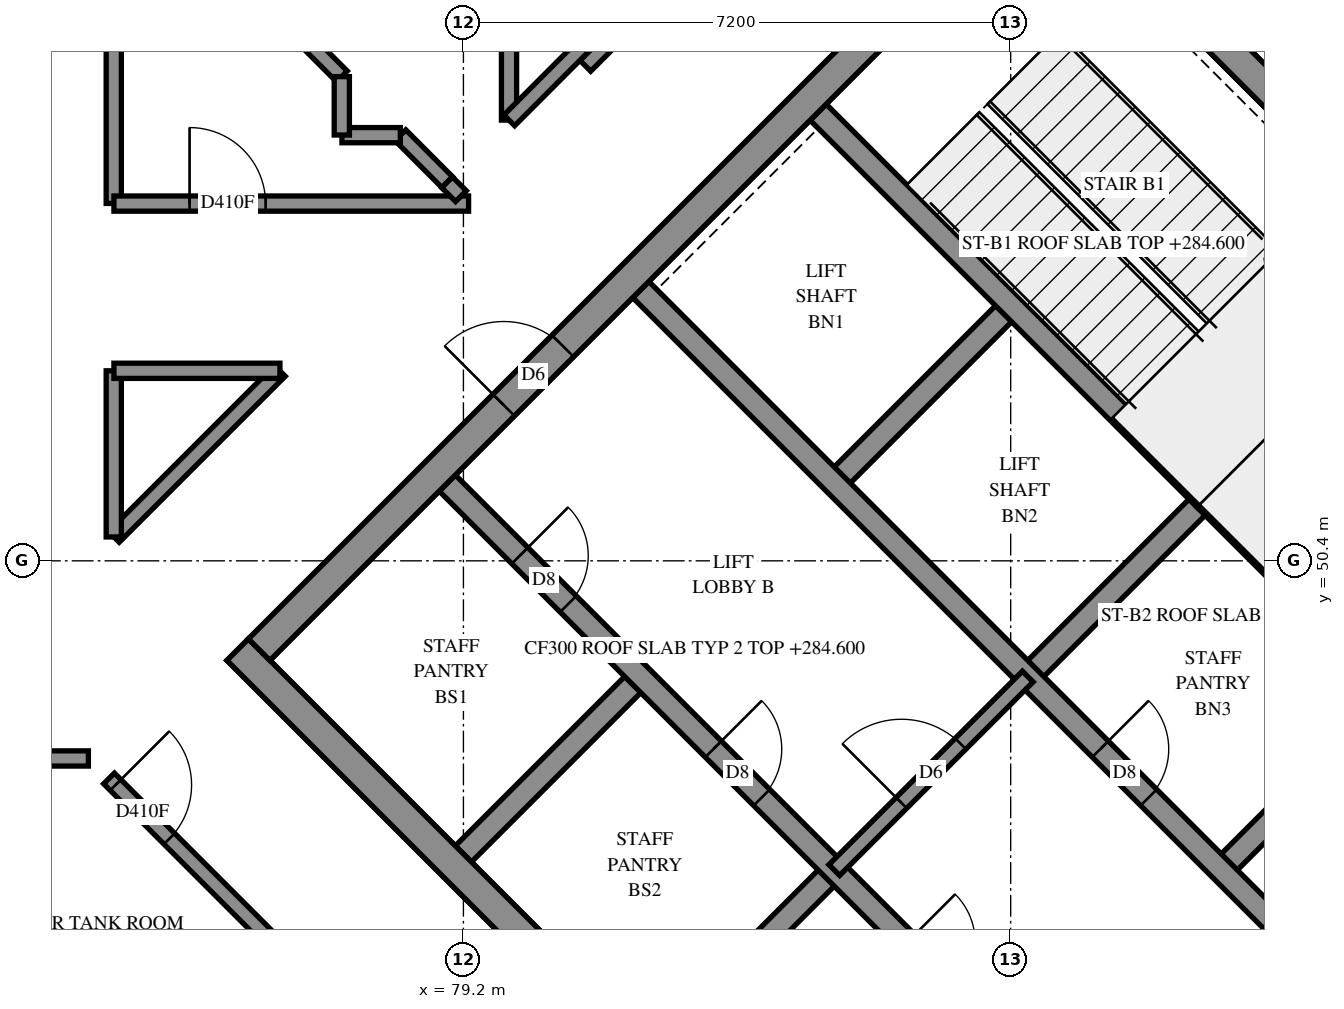
"""IFC4 building model, lengths in metres.
Left out: names, types, materials, properties, quantities, classifications, styles, units other than length and angle.
Written with IfcOpenShell. Run it as: python <this file> out.ifc"""

import sys

from ifc_helpers import new_model, si_unit, direction, frame, frame_2d, origin, place, context, subcontext, project, spatial, rectangle, extrude, element, fill, save


model = new_model("IFC4")
c1 = context("Model", 3, precision=1e-05, world=origin(), true_north=direction((0.0, 1.0)))
c2 = subcontext(c1, "Body", "Model", "MODEL_VIEW")
j1 = project(units=[si_unit("LENGTHUNIT", "METRE"), si_unit("PLANEANGLEUNIT", "RADIAN")], contexts=[c1])
p1 = place(None, origin())
s1 = spatial("IfcSite", under=j1, at=p1, CompositionType="ELEMENT")
p2 = place(p1, origin())
s2 = spatial("IfcBuilding", under=s1, at=p2, CompositionType="ELEMENT")
p3 = place(p2, frame((0.0, 0.0, 284.6)))
s3 = spatial("IfcBuildingStorey", under=s2, at=p3, CompositionType="ELEMENT", Elevation=284.6)
p4 = place(p3, frame((76.23, 49.231, -0.3), z_axis=(0.0, 0.0, 1.0), x_axis=(0.7071034917, -0.7071100706, 0.0)))
e1 = element("IfcWall", 1, at=p4, inside=s3, PredefinedType="SHEAR", context=c2, shape_type="SweptSolid", body=[
    extrude(rectangle(XDim=15.2, YDim=0.4, at=frame_2d((7.6, 0.0))), origin(), (0.0, 0.0, 1.0), 5.3),
])
p5 = place(p3, frame((86.695, 59.696, -0.3), z_axis=(0.0, 0.0, 1.0), x_axis=(0.7071100706, -0.7071034917, 0.0)))
e2 = element("IfcWall", 2, at=p5, inside=s3, PredefinedType="SHEAR", context=c2, shape_type="SweptSolid", body=[
    extrude(rectangle(XDim=15.2, YDim=0.4, at=frame_2d((7.6, 0.0))), origin(), (0.0, 0.0, 1.0), 5.3),
])
p6 = place(p5, frame((10.4, 0.0, 0.3)))
e3 = element("IfcOpeningElement", 3, at=p6, cuts=e2, PredefinedType="OPENING", context=c2, shape_type="SweptSolid", body=[
    extrude(rectangle(XDim=0.8, YDim=2.1, at=frame_2d((0.4, 1.05))), frame((0.0, 0.21, 0.0), z_axis=(0.0, -1.0, 0.0), x_axis=(1.0, 0.0, 0.0)), (0.0, 0.0, 1.0), 0.42),
])
p7 = place(p3, frame((76.513, 49.231, -0.3), z_axis=(0.0, 0.0, 1.0), x_axis=(0.7071067812, 0.7071067812, 0.0)))
e4 = element("IfcWall", 4, at=p7, inside=s3, PredefinedType="SHEAR", context=c2, shape_type="SweptSolid", body=[
    extrude(rectangle(XDim=14.4, YDim=0.4, at=frame_2d((7.2, 0.0))), origin(), (0.0, 0.0, 1.0), 5.3),
])
p8 = place(p7, frame((4.55, 0.0, 0.3)))
e5 = element("IfcOpeningElement", 5, at=p8, cuts=e4, PredefinedType="OPENING", context=c2, shape_type="SweptSolid", body=[
    extrude(rectangle(XDim=1.1, YDim=2.1, at=frame_2d((0.55, 1.05))), frame((0.0, 0.21, 0.0), z_axis=(0.0, -1.0, 0.0), x_axis=(1.0, 0.0, 0.0)), (0.0, 0.0, 1.0), 0.42),
])
p9 = place(p7, frame((11.35, 0.0, 0.3)))
e6 = element("IfcOpeningElement", 6, at=p9, cuts=e4, PredefinedType="OPENING", context=c2, shape_type="SweptSolid", body=[
    extrude(rectangle(XDim=1.1, YDim=2.1, at=frame_2d((0.55, 1.05))), frame((0.0, 0.21, 0.0), z_axis=(0.0, -1.0, 0.0), x_axis=(1.0, 0.0, 0.0)), (0.0, 0.0, 1.0), 0.42),
])
p10 = place(p3, frame((86.978, 38.766, -0.3), z_axis=(0.0, 0.0, 1.0), x_axis=(0.7071067812, 0.7071067812, 0.0)))
e7 = element("IfcWall", 7, at=p10, inside=s3, PredefinedType="SHEAR", context=c2, shape_type="SweptSolid", body=[
    extrude(rectangle(XDim=14.4, YDim=0.4, at=frame_2d((7.2, 0.0))), origin(), (0.0, 0.0, 1.0), 5.3),
])
p11 = place(p10, frame((4.55, 0.0, 0.3)))
e8 = element("IfcOpeningElement", 8, at=p11, cuts=e7, PredefinedType="OPENING", context=c2, shape_type="SweptSolid", body=[
    extrude(rectangle(XDim=1.1, YDim=2.1, at=frame_2d((0.55, 1.05))), frame((0.0, 0.21, 0.0), z_axis=(0.0, -1.0, 0.0), x_axis=(1.0, 0.0, 0.0)), (0.0, 0.0, 1.0), 0.42),
])
p12 = place(p10, frame((11.35, 0.0, 0.3)))
e9 = element("IfcOpeningElement", 9, at=p12, cuts=e7, PredefinedType="OPENING", context=c2, shape_type="SweptSolid", body=[
    extrude(rectangle(XDim=1.1, YDim=2.1, at=frame_2d((0.55, 1.05))), frame((0.0, 0.21, 0.0), z_axis=(0.0, -1.0, 0.0), x_axis=(1.0, 0.0, 0.0)), (0.0, 0.0, 1.0), 0.42),
])
for number, where, z_axis, x_axis in (
    (10, (79.2, 46.544, 0.0), (0.0, 0.0, 1.0), (0.707, 0.707, 0.0)),
    (11, (84.079, 51.423, 0.0), (0.0, 0.0, 1.0), (0.707, 0.707, 0.0)),
):
    element("IfcWall", number, at=place(p3, frame(where, z_axis=z_axis, x_axis=x_axis)), inside=s3, PredefinedType="SOLIDWALL", context=c2, shape_type="SweptSolid", body=[
        extrude(rectangle(XDim=3.3, YDim=0.3, at=frame_2d((1.65, 0.0))), origin(), (0.0, 0.0, 1.0), 5.7),
    ])
p13 = place(p3, frame((81.746, 43.999, 0.0), z_axis=(0.0, 0.0, 1.0), x_axis=(0.7071067812, 0.7071067812, 0.0)))
e12 = element("IfcWall", 12, at=p13, inside=s3, PredefinedType="SOLIDWALL", context=c2, shape_type="SweptSolid", body=[
    extrude(rectangle(XDim=3.3, YDim=0.3, at=frame_2d((1.65, 0.0))), origin(), (0.0, 0.0, 1.0), 5.7),
])
for number, where, z_axis, x_axis in (
    (13, (86.625, 48.878, 0.0), (0.0, 0.0, 1.0), (0.707, 0.707, 0.0)),
    (14, (89.17, 46.332, 0.0), (0.0, 0.0, 1.0), (0.707, 0.707, 0.0)),
):
    element("IfcWall", number, at=place(p3, frame(where, z_axis=z_axis, x_axis=x_axis)), inside=s3, PredefinedType="SOLIDWALL", context=c2, shape_type="SweptSolid", body=[
        extrude(rectangle(XDim=3.3, YDim=0.3, at=frame_2d((1.65, 0.0))), origin(), (0.0, 0.0, 1.0), 5.7),
    ])
p14 = place(p3, frame((78.988, 51.423, 0.0), z_axis=(0.0, 0.0, 1.0), x_axis=(0.7071067812, -0.7071067812, 0.0)))
e15 = element("IfcWall", 15, at=p14, inside=s3, PredefinedType="SOLIDWALL", context=c2, shape_type="SweptSolid", body=[
    extrude(rectangle(XDim=14.4, YDim=0.3, at=frame_2d((7.2, 0.0))), origin(), (0.0, 0.0, 1.0), 5.7),
])
p15 = place(p14, frame((1.35, 0.0, 0.0)))
e16 = element("IfcOpeningElement", 16, at=p15, cuts=e15, PredefinedType="OPENING", context=c2, shape_type="SweptSolid", body=[
    extrude(rectangle(XDim=0.9, YDim=2.1, at=frame_2d((0.45, 1.05))), frame((0.0, 0.16, 0.0), z_axis=(0.0, -1.0, 0.0), x_axis=(1.0, 0.0, 0.0)), (0.0, 0.0, 1.0), 0.32),
])
p16 = place(p14, frame((4.95, 0.0, 0.0)))
e17 = element("IfcOpeningElement", 17, at=p16, cuts=e15, PredefinedType="OPENING", context=c2, shape_type="SweptSolid", body=[
    extrude(rectangle(XDim=0.9, YDim=2.1, at=frame_2d((0.45, 1.05))), frame((0.0, 0.16, 0.0), z_axis=(0.0, -1.0, 0.0), x_axis=(1.0, 0.0, 0.0)), (0.0, 0.0, 1.0), 0.32),
])
p17 = place(p14, frame((8.55, 0.0, 0.0)))
e18 = element("IfcOpeningElement", 18, at=p17, cuts=e15, PredefinedType="OPENING", context=c2, shape_type="SweptSolid", body=[
    extrude(rectangle(XDim=0.9, YDim=2.1, at=frame_2d((0.45, 1.05))), frame((0.0, 0.16, 0.0), z_axis=(0.0, -1.0, 0.0), x_axis=(1.0, 0.0, 0.0)), (0.0, 0.0, 1.0), 0.32),
])
p18 = place(p14, frame((12.05, 0.0, 0.0)))
e19 = element("IfcOpeningElement", 19, at=p18, cuts=e15, PredefinedType="OPENING", context=c2, shape_type="SweptSolid", body=[
    extrude(rectangle(XDim=1.1, YDim=2.1, at=frame_2d((0.55, 1.05))), frame((0.0, 0.16, 0.0), z_axis=(0.0, -1.0, 0.0), x_axis=(1.0, 0.0, 0.0)), (0.0, 0.0, 1.0), 0.32),
])
p19 = place(p3, frame((81.534, 53.969, 0.0), z_axis=(0.0, 0.0, 1.0), x_axis=(0.707103309, -0.7071102534, 0.0)))
e20 = element("IfcWall", 20, at=p19, inside=s3, PredefinedType="SOLIDWALL", context=c2, shape_type="SweptSolid", body=[
    extrude(rectangle(XDim=14.4, YDim=0.3, at=frame_2d((7.2, 0.0))), origin(), (0.0, 0.0, 1.0), 5.7),
])
p20 = place(p19, frame((8.55, 0.0, 0.0)))
e21 = element("IfcOpeningElement", 21, at=p20, cuts=e20, PredefinedType="OPENING", context=c2, shape_type="SweptSolid", body=[
    extrude(rectangle(XDim=0.9, YDim=2.1, at=frame_2d((0.45, 1.05))), frame((0.0, 0.16, 0.0), z_axis=(0.0, -1.0, 0.0), x_axis=(1.0, 0.0, 0.0)), (0.0, 0.0, 1.0), 0.32),
])
p21 = place(p19, frame((12.05, 0.0, 0.0)))
e22 = element("IfcOpeningElement", 22, at=p21, cuts=e20, PredefinedType="OPENING", context=c2, shape_type="SweptSolid", body=[
    extrude(rectangle(XDim=1.1, YDim=2.1, at=frame_2d((0.55, 1.05))), frame((0.0, 0.16, 0.0), z_axis=(0.0, -1.0, 0.0), x_axis=(1.0, 0.0, 0.0)), (0.0, 0.0, 1.0), 0.32),
])
for number, where, z_axis, x_axis in (
    (23, (83.867, 56.302, 0.0), (0.0, 0.0, 1.0), (0.707, -0.707, 0.0)),
    (24, (88.958, 51.211, 0.0), (0.0, 0.0, 1.0), (0.707, -0.707, 0.0)),
):
    element("IfcWall", number, at=place(p3, frame(where, z_axis=z_axis, x_axis=x_axis)), inside=s3, PredefinedType="SOLIDWALL", context=c2, shape_type="SweptSolid", body=[
        extrude(rectangle(XDim=7.2, YDim=0.3, at=frame_2d((3.6, 0.0))), origin(), (0.0, 0.0, 1.0), 5.7),
    ])
p22 = place(p3, frame((88.958, 51.211, 0.0), z_axis=(0.0, 0.0, 1.0), x_axis=(0.7071067812, 0.7071067812, 0.0)))
e25 = element("IfcWall", 25, at=p22, inside=s3, PredefinedType="SOLIDWALL", context=c2, shape_type="SweptSolid", body=[
    extrude(rectangle(XDim=4.2, YDim=0.3, at=frame_2d((2.1, 0.0))), origin(), (0.0, 0.0, 1.0), 5.7),
])
p23 = place(p3, frame((84.079, 46.332, 0.0), z_axis=(0.0, 0.0, 1.0), x_axis=(0.7071067812, 0.7071067812, 0.0)))
e26 = element("IfcWall", 26, at=p23, inside=s3, PredefinedType="PARTITIONING", context=c2, shape_type="SweptSolid", body=[
    extrude(rectangle(XDim=3.6, YDim=0.2, at=frame_2d((1.8, 0.0))), origin(), (0.0, 0.0, 1.0), 5.7),
])
p24 = place(p23, frame((1.25, 0.0, 0.0)))
e27 = element("IfcOpeningElement", 27, at=p24, cuts=e26, PredefinedType="OPENING", context=c2, shape_type="SweptSolid", body=[
    extrude(rectangle(XDim=1.1, YDim=2.1, at=frame_2d((0.55, 1.05))), frame((0.0, 0.11, 0.0), z_axis=(0.0, -1.0, 0.0), x_axis=(1.0, 0.0, 0.0)), (0.0, 0.0, 1.0), 0.22),
])
p25 = place(p3, frame((86.833, 62.947, 0.0), z_axis=(0.0, 0.0, 1.0), x_axis=(0.7071067812, -0.7071067812, 0.0)))
e28 = element("IfcWall", 28, at=p25, inside=s3, PredefinedType="PARTITIONING", context=c2, shape_type="SweptSolid", body=[
    extrude(rectangle(XDim=19.601, YDim=0.2, at=frame_2d((9.8, 0.0))), origin(), (0.0, 0.0, 1.0), 5.7),
])
p26 = place(p25, frame((6.487, 0.0, 0.0)))
e29 = element("IfcOpeningElement", 29, at=p26, cuts=e28, PredefinedType="OPENING", context=c2, shape_type="SweptSolid", body=[
    extrude(rectangle(XDim=1.0, YDim=2.1, at=frame_2d((0.5, 1.05))), frame((0.0, 0.11, 0.0), z_axis=(0.0, -1.0, 0.0), x_axis=(1.0, 0.0, 0.0)), (0.0, 0.0, 1.0), 0.22),
])
p27 = place(p25, frame((13.688, 0.0, 0.0)))
e30 = element("IfcOpeningElement", 30, at=p27, cuts=e28, PredefinedType="OPENING", context=c2, shape_type="SweptSolid", body=[
    extrude(rectangle(XDim=1.0, YDim=2.1, at=frame_2d((0.5, 1.05))), frame((0.0, 0.11, 0.0), z_axis=(0.0, -1.0, 0.0), x_axis=(1.0, 0.0, 0.0)), (0.0, 0.0, 1.0), 0.22),
])
p28 = place(p3, frame((55.0, 47.8, 0.0), z_axis=(0.0, 0.0, 1.0), x_axis=(1.0, 0.0, 0.0)))
e31 = element("IfcWall", 31, at=p28, inside=s3, PredefinedType="PARTITIONING", context=c2, shape_type="SweptSolid", body=[
    extrude(rectangle(XDim=19.266, YDim=0.2, at=frame_2d((9.633, 0.0))), origin(), (0.0, 0.0, 1.0), 5.7),
])
p29 = place(p28, frame((4.633, 0.0, 0.0)))
e32 = element("IfcOpeningElement", 32, at=p29, cuts=e31, PredefinedType="OPENING", context=c2, shape_type="SweptSolid", body=[
    extrude(rectangle(XDim=1.0, YDim=2.1, at=frame_2d((0.5, 1.05))), frame((0.0, 0.11, 0.0), z_axis=(0.0, -1.0, 0.0), x_axis=(1.0, 0.0, 0.0)), (0.0, 0.0, 1.0), 0.22),
])
p30 = place(p28, frame((6.707, 0.0, 0.0)))
e33 = element("IfcOpeningElement", 33, at=p30, cuts=e31, PredefinedType="OPENING", context=c2, shape_type="SweptSolid", body=[
    extrude(rectangle(XDim=1.0, YDim=2.1, at=frame_2d((0.5, 1.05))), frame((0.0, 0.11, 0.0), z_axis=(0.0, -1.0, 0.0), x_axis=(1.0, 0.0, 0.0)), (0.0, 0.0, 1.0), 0.22),
])
p31 = place(p28, frame((11.832, 0.0, 0.0)))
e34 = element("IfcOpeningElement", 34, at=p31, cuts=e31, PredefinedType="OPENING", context=c2, shape_type="SweptSolid", body=[
    extrude(rectangle(XDim=1.0, YDim=2.1, at=frame_2d((0.5, 1.05))), frame((0.0, 0.11, 0.0), z_axis=(0.0, -1.0, 0.0), x_axis=(1.0, 0.0, 0.0)), (0.0, 0.0, 1.0), 0.22),
])
p32 = place(p28, frame((13.908, 0.0, 0.0)))
e35 = element("IfcOpeningElement", 35, at=p32, cuts=e31, PredefinedType="OPENING", context=c2, shape_type="SweptSolid", body=[
    extrude(rectangle(XDim=1.0, YDim=2.1, at=frame_2d((0.5, 1.05))), frame((0.0, 0.11, 0.0), z_axis=(0.0, -1.0, 0.0), x_axis=(1.0, 0.0, 0.0)), (0.0, 0.0, 1.0), 0.22),
])
p33 = place(p3, frame((80.804, 56.912, 0.0), z_axis=(0.0, 0.0, 1.0), x_axis=(0.7069896038, 0.7072239391, 0.0)))
e36 = element("IfcWall", 36, at=p33, inside=s3, PredefinedType="PARTITIONING", context=c2, shape_type="SweptSolid", body=[
    extrude(rectangle(XDim=8.535, YDim=0.2, at=frame_2d((4.267, 0.0))), origin(), (0.0, 0.0, 1.0), 5.7),
])
p34 = place(p33, frame((0.859, 0.0, 0.0)))
e37 = element("IfcOpeningElement", 37, at=p34, cuts=e36, PredefinedType="OPENING", context=c2, shape_type="SweptSolid", body=[
    extrude(rectangle(XDim=1.0, YDim=2.1, at=frame_2d((0.5, 1.05))), frame((0.0, 0.11, 0.0), z_axis=(0.0, -1.0, 0.0), x_axis=(1.0, 0.0, 0.0)), (0.0, 0.0, 1.0), 0.22),
])
p35 = place(p3, frame((74.6, 55.102, 0.0), z_axis=(0.0, 0.0, 1.0), x_axis=(0.0, 1.0, 0.0)))
e38 = element("IfcWall", 38, at=p35, inside=s3, PredefinedType="PARTITIONING", context=c2, shape_type="SweptSolid", body=[
    extrude(rectangle(XDim=4.666, YDim=0.2, at=frame_2d((2.333, 0.0))), origin(), (0.0, 0.0, 1.0), 5.7),
])
p36 = place(p3, frame((74.602, 55.1, 0.0), z_axis=(0.0, 0.0, 1.0), x_axis=(1.0, 0.0, 0.0)))
e39 = element("IfcWall", 39, at=p36, inside=s3, PredefinedType="PARTITIONING", context=c2, shape_type="SweptSolid", body=[
    extrude(rectangle(XDim=4.666, YDim=0.2, at=frame_2d((2.333, 0.0))), origin(), (0.0, 0.0, 1.0), 5.7),
])
p37 = place(p36, frame((0.995, 0.0, 0.0)))
e40 = element("IfcOpeningElement", 40, at=p37, cuts=e39, PredefinedType="OPENING", context=c2, shape_type="SweptSolid", body=[
    extrude(rectangle(XDim=1.0, YDim=2.1, at=frame_2d((0.5, 1.05))), frame((0.0, 0.11, 0.0), z_axis=(0.0, -1.0, 0.0), x_axis=(1.0, 0.0, 0.0)), (0.0, 0.0, 1.0), 0.22),
])
p38 = place(p3, frame((74.537, 47.538, 0.0), z_axis=(0.0, 0.0, 1.0), x_axis=(0.7071067812, -0.7071067812, 0.0)))
e41 = element("IfcWall", 41, at=p38, inside=s3, PredefinedType="PARTITIONING", context=c2, shape_type="SweptSolid", body=[
    extrude(rectangle(XDim=4.336, YDim=0.2, at=frame_2d((2.168, 0.0))), origin(), (0.0, 0.0, 1.0), 5.7),
])
p39 = place(p38, frame((0.122, 0.0, 0.0)))
e42 = element("IfcOpeningElement", 42, at=p39, cuts=e41, PredefinedType="OPENING", context=c2, shape_type="SweptSolid", body=[
    extrude(rectangle(XDim=1.0, YDim=2.1, at=frame_2d((0.5, 1.05))), frame((0.0, 0.11, 0.0), z_axis=(0.0, -1.0, 0.0), x_axis=(1.0, 0.0, 0.0)), (0.0, 0.0, 1.0), 0.22),
])
p40 = place(p3, frame((74.601, 50.715, 0.0), z_axis=(0.0, 0.0, 1.0), x_axis=(0.7071067812, 0.7071067812, 0.0)))
e43 = element("IfcWall", 43, at=p40, inside=s3, PredefinedType="PARTITIONING", context=c2, shape_type="SweptSolid", body=[
    extrude(rectangle(XDim=3.089, YDim=0.2, at=frame_2d((1.544, 0.0))), origin(), (0.0, 0.0, 1.0), 5.7),
])
p41 = place(p3, frame((79.8, 56.198, 0.0), z_axis=(0.0, 0.0, 1.0), x_axis=(0.0, 1.0, 0.0)))
e44 = element("IfcWall", 44, at=p41, inside=s3, PredefinedType="PARTITIONING", context=c2, shape_type="SweptSolid", body=[
    extrude(rectangle(XDim=3.002, YDim=0.2, at=frame_2d((1.501, 0.0))), origin(), (0.0, 0.0, 1.0), 5.7),
])
p42 = place(p3, frame((75.601, 58.771, 0.0), z_axis=(0.0, 0.0, 1.0), x_axis=(0.7074604229, -0.7067529625, 0.0)))
e45 = element("IfcWall", 45, at=p42, inside=s3, PredefinedType="PARTITIONING", context=c2, shape_type="SweptSolid", body=[
    extrude(rectangle(XDim=2.827, YDim=0.2, at=frame_2d((1.413, 0.0))), origin(), (0.0, 0.0, 1.0), 5.7),
])
p43 = place(p3, frame((74.6, 50.714, 0.0), z_axis=(0.0, 0.0, 1.0), x_axis=(0.0, 1.0, 0.0)))
e46 = element("IfcWall", 46, at=p43, inside=s3, PredefinedType="PARTITIONING", context=c2, shape_type="SweptSolid", body=[
    extrude(rectangle(XDim=2.186, YDim=0.2, at=frame_2d((1.093, 0.0))), origin(), (0.0, 0.0, 1.0), 5.7),
])
p44 = place(p3, frame((74.602, 52.9, 0.0), z_axis=(0.0, 0.0, 1.0), x_axis=(1.0, 0.0, 0.0)))
e47 = element("IfcWall", 47, at=p44, inside=s3, PredefinedType="PARTITIONING", context=c2, shape_type="SweptSolid", body=[
    extrude(rectangle(XDim=2.184, YDim=0.2, at=frame_2d((1.092, 0.0))), origin(), (0.0, 0.0, 1.0), 5.7),
])
p45 = place(p3, frame((79.803, 56.195, 0.0), z_axis=(0.0, 0.0, 1.0), x_axis=(0.7063986127, 0.7078142412, 0.0)))
e48 = element("IfcWall", 48, at=p45, inside=s3, PredefinedType="PARTITIONING", context=c2, shape_type="SweptSolid", body=[
    extrude(rectangle(XDim=1.413, YDim=0.2, at=frame_2d((0.706, 0.0))), origin(), (0.0, 0.0, 1.0), 5.7),
])
p46 = place(p3, frame((78.371, 55.999, 0.0), z_axis=(0.0, 0.0, 1.0), x_axis=(0.7059598138, -0.7082518911, 0.0)))
e49 = element("IfcWall", 49, at=p46, inside=s3, PredefinedType="PARTITIONING", context=c2, shape_type="SweptSolid", body=[
    extrude(rectangle(XDim=0.873, YDim=0.2, at=frame_2d((0.436, 0.0))), origin(), (0.0, 0.0, 1.0), 5.7),
])
for number, where, z_axis, x_axis in (
    (50, (77.602, 56.0, 0.0), (0.0, 0.0, 1.0), (1.0, 0.0, 0.0)),
    (51, (77.6, 56.002, 0.0), (0.0, 0.0, 1.0), (0.0, 1.0, 0.0)),
):
    element("IfcWall", number, at=place(p3, frame(where, z_axis=z_axis, x_axis=x_axis)), inside=s3, PredefinedType="PARTITIONING", context=c2, shape_type="SweptSolid", body=[
        extrude(rectangle(XDim=0.768, YDim=0.2, at=frame_2d((0.384, 0.0))), origin(), (0.0, 0.0, 1.0), 5.7),
    ])
p47 = place(p3, frame((78.985, 55.379, 0.0), z_axis=(0.0, 0.0, 1.0), x_axis=(0.7096269458, -0.7045776024, 0.0)))
e52 = element("IfcWall", 52, at=p47, inside=s3, PredefinedType="PARTITIONING", context=c2, shape_type="SweptSolid", body=[
    extrude(rectangle(XDim=0.258, YDim=0.2, at=frame_2d((0.129, 0.0))), origin(), (0.0, 0.0, 1.0), 5.7),
])
p48 = place(p8, origin())
e53 = element("IfcDoor", 53, at=p48, inside=s3, OperationType="DOUBLE_DOOR_SINGLE_SWING", PredefinedType="DOOR", context=c2, shape_type="SweptSolid", body=[
    extrude(rectangle(XDim=1.1, YDim=2.1, at=frame_2d((0.55, 1.05))), frame((0.0, 0.025, 0.0), z_axis=(0.0, -1.0, 0.0), x_axis=(1.0, 0.0, 0.0)), (0.0, 0.0, 1.0), 0.05),
])
fill(e5, e53)
p49 = place(p24, origin())
e54 = element("IfcDoor", 54, at=p49, inside=s3, OperationType="DOUBLE_DOOR_SINGLE_SWING", PredefinedType="DOOR", context=c2, shape_type="SweptSolid", body=[
    extrude(rectangle(XDim=1.1, YDim=2.1, at=frame_2d((0.55, 1.05))), frame((0.0, 0.025, 0.0), z_axis=(0.0, -1.0, 0.0), x_axis=(1.0, 0.0, 0.0)), (0.0, 0.0, 1.0), 0.05),
])
fill(e27, e54)
p50 = place(p15, origin())
e55 = element("IfcDoor", 55, at=p50, inside=s3, OperationType="SINGLE_SWING_LEFT", PredefinedType="DOOR", context=c2, shape_type="SweptSolid", body=[
    extrude(rectangle(XDim=0.9, YDim=2.1, at=frame_2d((0.45, 1.05))), frame((0.0, 0.025, 0.0), z_axis=(0.0, -1.0, 0.0), x_axis=(1.0, 0.0, 0.0)), (0.0, 0.0, 1.0), 0.05),
])
fill(e16, e55)
p51 = place(p16, origin())
e56 = element("IfcDoor", 56, at=p51, inside=s3, OperationType="SINGLE_SWING_LEFT", PredefinedType="DOOR", context=c2, shape_type="SweptSolid", body=[
    extrude(rectangle(XDim=0.9, YDim=2.1, at=frame_2d((0.45, 1.05))), frame((0.0, 0.025, 0.0), z_axis=(0.0, -1.0, 0.0), x_axis=(1.0, 0.0, 0.0)), (0.0, 0.0, 1.0), 0.05),
])
fill(e17, e56)
p52 = place(p20, origin())
e57 = element("IfcDoor", 57, at=p52, inside=s3, OperationType="SINGLE_SWING_LEFT", PredefinedType="DOOR", context=c2, shape_type="SweptSolid", body=[
    extrude(rectangle(XDim=0.9, YDim=2.1, at=frame_2d((0.45, 1.05))), frame((0.0, 0.025, 0.0), z_axis=(0.0, -1.0, 0.0), x_axis=(1.0, 0.0, 0.0)), (0.0, 0.0, 1.0), 0.05),
])
fill(e21, e57)
p53 = place(p37, origin())
e58 = element("IfcDoor", 58, at=p53, inside=s3, OperationType="SINGLE_SWING_LEFT", PredefinedType="DOOR", context=c2, shape_type="SweptSolid", body=[
    extrude(rectangle(XDim=1.0, YDim=2.1, at=frame_2d((0.5, 1.05))), frame((0.0, 0.025, 0.0), z_axis=(0.0, -1.0, 0.0), x_axis=(1.0, 0.0, 0.0)), (0.0, 0.0, 1.0), 0.05),
])
fill(e40, e58)
p54 = place(p39, origin())
e59 = element("IfcDoor", 59, at=p54, inside=s3, OperationType="SINGLE_SWING_LEFT", PredefinedType="DOOR", context=c2, shape_type="SweptSolid", body=[
    extrude(rectangle(XDim=1.0, YDim=2.1, at=frame_2d((0.5, 1.05))), frame((0.0, 0.025, 0.0), z_axis=(0.0, -1.0, 0.0), x_axis=(1.0, 0.0, 0.0)), (0.0, 0.0, 1.0), 0.05),
])
fill(e42, e59)
save(model, sys.argv[1])
